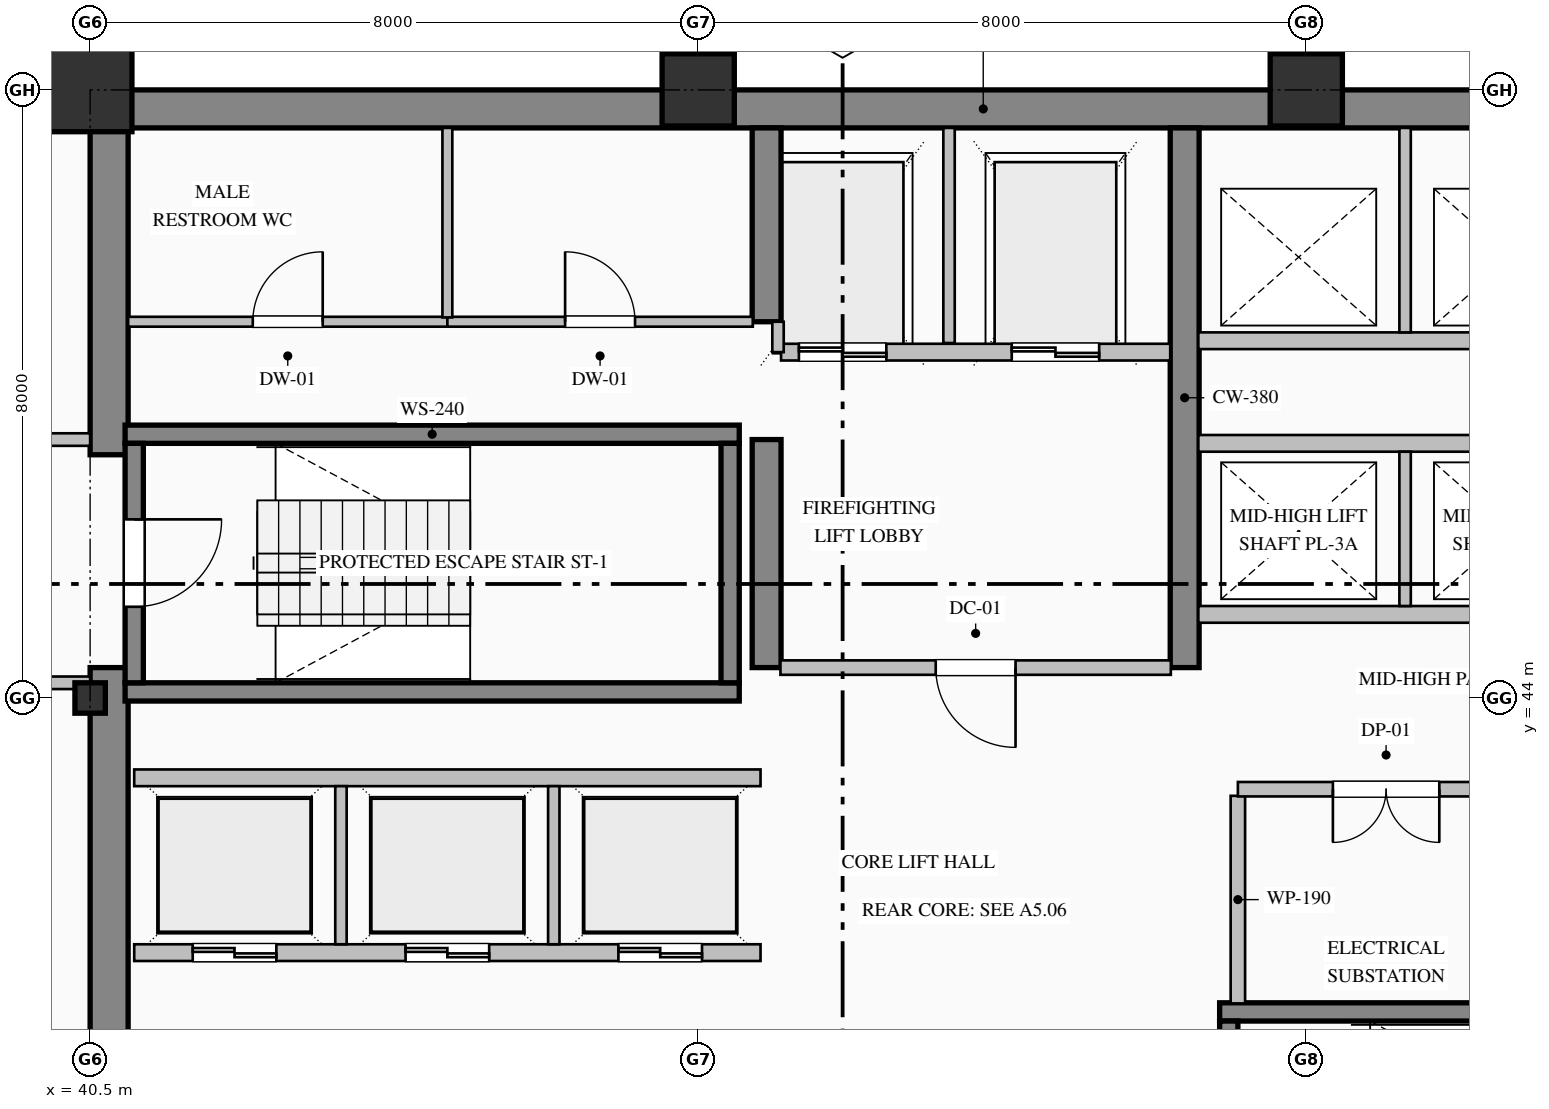
"""IFC4 building model, lengths in metres.
Left out: names, types, materials, properties, quantities, classifications, styles, units other than length and angle.
Written with IfcOpenShell. Run it as: python <this file> out.ifc"""

import sys

from ifc_helpers import new_model, si_unit, direction, frame, frame_2d, origin, origin_2d, place, context, subcontext, project, spatial, rectangle, hollow_rectangle, i_section, extrude, element, fill, save


model = new_model("IFC4")
c1 = context("Model", 3, precision=1e-05, world=origin(), true_north=direction((0.0, 1.0)))
c2 = subcontext(c1, "Body", "Model", "MODEL_VIEW")
j1 = project(units=[si_unit("LENGTHUNIT", "METRE"), si_unit("PLANEANGLEUNIT", "RADIAN")], contexts=[c1])
p1 = place(None, origin())
s1 = spatial("IfcSite", under=j1, at=p1, CompositionType="ELEMENT")
p2 = place(p1, origin())
s2 = spatial("IfcBuilding", under=s1, at=p2, CompositionType="ELEMENT")
p3 = place(p2, frame((0.0, 0.0, 119.0)))
s3 = spatial("IfcBuildingStorey", under=s2, at=p3, CompositionType="ELEMENT", Elevation=119.0)
p4 = place(p3, frame((40.5, 51.75, 0.0), z_axis=(0.0, 0.0, 1.0), x_axis=(1.0, 0.0, 0.0)))
e1 = element("IfcWall", 1, at=p4, inside=s3, PredefinedType="SHEAR", context=c2, shape_type="SweptSolid", body=[
    extrude(rectangle(XDim=23.5, YDim=0.5, at=frame_2d((11.75, 0.0))), origin(), (0.0, 0.0, 1.0), 3.765),
])
p5 = place(p3, frame((40.75, 36.5, 0.0), z_axis=(0.0, 0.0, 1.0), x_axis=(0.0, 1.0, 0.0)))
e2 = element("IfcWall", 2, at=p5, inside=s3, PredefinedType="SHEAR", context=c2, shape_type="SweptSolid", body=[
    extrude(rectangle(XDim=7.9, YDim=0.5, at=frame_2d((3.95, 0.0))), origin(), (0.0, 0.0, 1.0), 3.765),
])
p6 = place(p3, frame((40.75, 47.2, 0.0), z_axis=(0.0, 0.0, 1.0), x_axis=(0.0, 1.0, 0.0)))
e3 = element("IfcWall", 3, at=p6, inside=s3, PredefinedType="SHEAR", context=c2, shape_type="SweptSolid", body=[
    extrude(rectangle(XDim=4.3, YDim=0.5, at=frame_2d((2.15, 0.0))), origin(), (0.0, 0.0, 1.0), 3.765),
])
p7 = place(p3, frame((49.4, 44.4, 0.0), z_axis=(0.0, 0.0, 1.0), x_axis=(0.0, 1.0, 0.0)))
e4 = element("IfcWall", 4, at=p7, inside=s3, PredefinedType="SHEAR", context=c2, shape_type="SweptSolid", body=[
    extrude(rectangle(XDim=3.0, YDim=0.38, at=frame_2d((1.5, 0.0))), origin(), (0.0, 0.0, 1.0), 3.765),
])
p8 = place(p3, frame((49.4, 48.95, 0.0), z_axis=(0.0, 0.0, 1.0), x_axis=(0.0, 1.0, 0.0)))
e5 = element("IfcWall", 5, at=p8, inside=s3, PredefinedType="SHEAR", context=c2, shape_type="SweptSolid", body=[
    extrude(rectangle(XDim=2.55, YDim=0.38, at=frame_2d((1.275, 0.0))), origin(), (0.0, 0.0, 1.0), 3.765),
])
p9 = place(p3, frame((54.9, 44.4, 0.0), z_axis=(0.0, 0.0, 1.0), x_axis=(0.0, 1.0, 0.0)))
e6 = element("IfcWall", 6, at=p9, inside=s3, PredefinedType="SHEAR", context=c2, shape_type="SweptSolid", body=[
    extrude(rectangle(XDim=7.1, YDim=0.38, at=frame_2d((3.55, 0.0))), origin(), (0.0, 0.0, 1.0), 3.765),
])
p10 = place(p3, frame((40.5, 44.0, 0.0), z_axis=(0.0, 0.0, 1.0), x_axis=(1.0, 0.0, 0.0)))
e7 = element("IfcColumn", 7, at=p10, inside=s3, PredefinedType="COLUMN", context=c2, shape_type="SweptSolid", body=[
    extrude(i_section(OverallWidth=0.4, OverallDepth=0.4, WebThickness=0.013, FlangeThickness=0.021, FilletRadius=0.022, at=origin_2d()), origin(), (0.0, 0.0, 1.0), 4.0),
])
p11 = place(p3, frame((40.5, 52.0, 0.0), z_axis=(0.0, 0.0, 1.0), x_axis=(1.0, 0.0, 0.0)))
e8 = element("IfcColumn", 8, at=p11, inside=s3, PredefinedType="COLUMN", context=c2, shape_type="SweptSolid", body=[
    extrude(hollow_rectangle(XDim=1.1, YDim=1.1, WallThickness=0.04, at=origin_2d()), origin(), (0.0, 0.0, 1.0), 4.0),
])
for number, where, z_axis, x_axis in (
    (9, (48.5, 52.0, 0.0), (0.0, 0.0, 1.0), (1.0, 0.0, 0.0)),
    (10, (56.5, 52.0, 0.0), (0.0, 0.0, 1.0), (1.0, 0.0, 0.0)),
):
    element("IfcColumn", number, at=place(p3, frame(where, z_axis=z_axis, x_axis=x_axis)), inside=s3, PredefinedType="COLUMN", context=c2, shape_type="SweptSolid", body=[
        extrude(hollow_rectangle(XDim=0.95, YDim=0.95, WallThickness=0.036, at=origin_2d()), origin(), (0.0, 0.0, 1.0), 4.0),
    ])
p12 = place(p3, frame((13.0, 51.83, 0.0), z_axis=(0.0, 0.0, 1.0), x_axis=(1.0, 0.0, 0.0)))
e11 = element("IfcWall", 11, at=p12, inside=s3, PredefinedType="SOLIDWALL", context=c2, shape_type="SweptSolid", body=[
    extrude(rectangle(XDim=27.52, YDim=0.34, at=frame_2d((13.76, 0.0))), origin(), (0.0, 0.0, 1.0), 3.265),
])
for number, where, z_axis, x_axis in (
    (12, (40.96, 47.47, 0.0), (0.0, 0.0, 1.0), (1.0, 0.0, 0.0)),
    (13, (49.04, 44.08, 0.0), (0.0, 0.0, 1.0), (-1.0, 0.0, 0.0)),
):
    element("IfcWall", number, at=place(p3, frame(where, z_axis=z_axis, x_axis=x_axis)), inside=s3, PredefinedType="SOLIDWALL", context=c2, shape_type="SweptSolid", body=[
        extrude(rectangle(XDim=8.08, YDim=0.24, at=frame_2d((4.04, 0.0))), origin(), (0.0, 0.0, 1.0), 4.0),
    ])
p13 = place(p3, frame((41.08, 47.35, 0.0), z_axis=(0.0, 0.0, 1.0), x_axis=(0.0, -1.0, 0.0)))
e14 = element("IfcWall", 14, at=p13, inside=s3, PredefinedType="SOLIDWALL", context=c2, shape_type="SweptSolid", body=[
    extrude(rectangle(XDim=3.15, YDim=0.24, at=frame_2d((1.575, 0.0))), origin(), (0.0, 0.0, 1.0), 4.0),
])
p14 = place(p13, frame((1.0, 0.0, 0.0)))
e15 = element("IfcOpeningElement", 15, at=p14, cuts=e14, PredefinedType="OPENING", context=c2, shape_type="SweptSolid", body=[
    extrude(rectangle(XDim=1.15, YDim=2.2, at=frame_2d((0.575, 1.1))), frame((0.0, 0.13, 0.0), z_axis=(0.0, -1.0, 0.0), x_axis=(1.0, 0.0, 0.0)), (0.0, 0.0, 1.0), 0.26),
])
p15 = place(p3, frame((48.92, 44.2, 0.0), z_axis=(0.0, 0.0, 1.0), x_axis=(0.0, 1.0, 0.0)))
e16 = element("IfcWall", 16, at=p15, inside=s3, PredefinedType="SOLIDWALL", context=c2, shape_type="SweptSolid", body=[
    extrude(rectangle(XDim=3.15, YDim=0.24, at=frame_2d((1.575, 0.0))), origin(), (0.0, 0.0, 1.0), 4.0),
])
p16 = place(p3, frame((55.36, 39.87, 0.0), z_axis=(0.0, 0.0, 1.0), x_axis=(1.0, 0.0, 0.0)))
e17 = element("IfcWall", 17, at=p16, inside=s3, PredefinedType="SOLIDWALL", context=c2, shape_type="SweptSolid", body=[
    extrude(rectangle(XDim=8.08, YDim=0.24, at=frame_2d((4.04, 0.0))), origin(), (0.0, 0.0, 1.0), 4.0),
])
p17 = place(p3, frame((55.48, 39.75, 0.0), z_axis=(0.0, 0.0, 1.0), x_axis=(0.0, -1.0, 0.0)))
e18 = element("IfcWall", 18, at=p17, inside=s3, PredefinedType="SOLIDWALL", context=c2, shape_type="SweptSolid", body=[
    extrude(rectangle(XDim=3.15, YDim=0.24, at=frame_2d((1.575, 0.0))), origin(), (0.0, 0.0, 1.0), 4.0),
])
p18 = place(p17, frame((1.0, 0.0, 0.0)))
e19 = element("IfcOpeningElement", 19, at=p18, cuts=e18, PredefinedType="OPENING", context=c2, shape_type="SweptSolid", body=[
    extrude(rectangle(XDim=1.15, YDim=2.2, at=frame_2d((0.575, 1.1))), frame((0.0, 0.13, 0.0), z_axis=(0.0, -1.0, 0.0), x_axis=(1.0, 0.0, 0.0)), (0.0, 0.0, 1.0), 0.26),
])
p19 = place(p3, frame((54.71, 48.55, 0.0), z_axis=(0.0, 0.0, 1.0), x_axis=(-1.0, 0.0, 0.0)))
e20 = element("IfcWall", 20, at=p19, inside=s3, PredefinedType="PARTITIONING", context=c2, shape_type="SweptSolid", body=[
    extrude(rectangle(XDim=5.12, YDim=0.22, at=frame_2d((2.56, 0.0))), origin(), (0.0, 0.0, 1.0), 3.765),
])
p20 = place(p19, frame((3.735, 0.0, 0.0)))
e21 = element("IfcOpeningElement", 21, at=p20, cuts=e20, PredefinedType="OPENING", context=c2, shape_type="SweptSolid", body=[
    extrude(rectangle(XDim=1.15, YDim=2.2, at=frame_2d((0.575, 1.1))), frame((0.0, 0.12, 0.0), z_axis=(0.0, -1.0, 0.0), x_axis=(1.0, 0.0, 0.0)), (0.0, 0.0, 1.0), 0.24),
])
p21 = place(p19, frame((0.935, 0.0, 0.0)))
e22 = element("IfcOpeningElement", 22, at=p21, cuts=e20, PredefinedType="OPENING", context=c2, shape_type="SweptSolid", body=[
    extrude(rectangle(XDim=1.15, YDim=2.2, at=frame_2d((0.575, 1.1))), frame((0.0, 0.12, 0.0), z_axis=(0.0, -1.0, 0.0), x_axis=(1.0, 0.0, 0.0)), (0.0, 0.0, 1.0), 0.24),
])
p22 = place(p3, frame((51.8, 48.67, 0.0), z_axis=(0.0, 0.0, 1.0), x_axis=(0.0, 1.0, 0.0)))
e23 = element("IfcWall", 23, at=p22, inside=s3, PredefinedType="PARTITIONING", context=c2, shape_type="SweptSolid", body=[
    extrude(rectangle(XDim=2.83, YDim=0.15, at=frame_2d((1.415, 0.0))), origin(), (0.0, 0.0, 1.0), 3.765),
])
p23 = place(p3, frame((49.55, 48.55, 0.0), z_axis=(0.0, 0.0, 1.0), x_axis=(0.0, 1.0, 0.0)))
e24 = element("IfcWall", 24, at=p23, inside=s3, PredefinedType="PARTITIONING", context=c2, shape_type="SweptSolid", body=[
    extrude(rectangle(XDim=0.4, YDim=0.15, at=frame_2d((0.2, 0.0))), origin(), (0.0, 0.0, 1.0), 3.765),
])
p24 = place(p3, frame((49.32, 40.65, 0.0), z_axis=(0.0, 0.0, 1.0), x_axis=(-1.0, 0.0, 0.0)))
e25 = element("IfcWall", 25, at=p24, inside=s3, PredefinedType="PARTITIONING", context=c2, shape_type="SweptSolid", body=[
    extrude(rectangle(XDim=8.24, YDim=0.22, at=frame_2d((4.12, 0.0))), origin(), (0.0, 0.0, 1.0), 3.765),
])
p25 = place(p24, frame((6.37, 0.0, 0.0)))
e26 = element("IfcOpeningElement", 26, at=p25, cuts=e25, PredefinedType="OPENING", context=c2, shape_type="SweptSolid", body=[
    extrude(rectangle(XDim=1.1, YDim=2.2, at=frame_2d((0.55, 1.1))), frame((0.0, 0.12, 0.0), z_axis=(0.0, -1.0, 0.0), x_axis=(1.0, 0.0, 0.0)), (0.0, 0.0, 1.0), 0.24),
])
p26 = place(p24, frame((3.57, 0.0, 0.0)))
e27 = element("IfcOpeningElement", 27, at=p26, cuts=e25, PredefinedType="OPENING", context=c2, shape_type="SweptSolid", body=[
    extrude(rectangle(XDim=1.1, YDim=2.2, at=frame_2d((0.55, 1.1))), frame((0.0, 0.12, 0.0), z_axis=(0.0, -1.0, 0.0), x_axis=(1.0, 0.0, 0.0)), (0.0, 0.0, 1.0), 0.24),
])
p27 = place(p24, frame((0.77, 0.0, 0.0)))
e28 = element("IfcOpeningElement", 28, at=p27, cuts=e25, PredefinedType="OPENING", context=c2, shape_type="SweptSolid", body=[
    extrude(rectangle(XDim=1.1, YDim=2.2, at=frame_2d((0.55, 1.1))), frame((0.0, 0.12, 0.0), z_axis=(0.0, -1.0, 0.0), x_axis=(1.0, 0.0, 0.0)), (0.0, 0.0, 1.0), 0.24),
])
p28 = place(p3, frame((41.08, 42.95, 0.0), z_axis=(0.0, 0.0, 1.0), x_axis=(1.0, 0.0, 0.0)))
e29 = element("IfcWall", 29, at=p28, inside=s3, PredefinedType="PARTITIONING", context=c2, shape_type="SweptSolid", body=[
    extrude(rectangle(XDim=8.24, YDim=0.22, at=frame_2d((4.12, 0.0))), origin(), (0.0, 0.0, 1.0), 3.765),
])
for number, where, z_axis, x_axis in (
    (30, (43.8, 40.76, 0.0), (0.0, 0.0, 1.0), (0.0, 1.0, 0.0)),
    (31, (46.6, 40.76, 0.0), (0.0, 0.0, 1.0), (0.0, 1.0, 0.0)),
):
    element("IfcWall", number, at=place(p3, frame(where, z_axis=z_axis, x_axis=x_axis)), inside=s3, PredefinedType="PARTITIONING", context=c2, shape_type="SweptSolid", body=[
        extrude(rectangle(XDim=2.08, YDim=0.15, at=frame_2d((1.04, 0.0))), origin(), (0.0, 0.0, 1.0), 3.765),
    ])
for number, where, z_axis, x_axis in (
    (32, (63.32, 45.1, 0.0), (0.0, 0.0, 1.0), (-1.0, 0.0, 0.0)),
    (33, (55.08, 47.35, 0.0), (0.0, 0.0, 1.0), (1.0, 0.0, 0.0)),
):
    element("IfcWall", number, at=place(p3, frame(where, z_axis=z_axis, x_axis=x_axis)), inside=s3, PredefinedType="PARTITIONING", context=c2, shape_type="SweptSolid", body=[
        extrude(rectangle(XDim=8.24, YDim=0.22, at=frame_2d((4.12, 0.0))), origin(), (0.0, 0.0, 1.0), 3.765),
    ])
p29 = place(p3, frame((57.8, 45.21, 0.0), z_axis=(0.0, 0.0, 1.0), x_axis=(0.0, 1.0, 0.0)))
e34 = element("IfcWall", 34, at=p29, inside=s3, PredefinedType="PARTITIONING", context=c2, shape_type="SweptSolid", body=[
    extrude(rectangle(XDim=2.03, YDim=0.15, at=frame_2d((1.015, 0.0))), origin(), (0.0, 0.0, 1.0), 3.765),
])
p30 = place(p3, frame((63.32, 48.7, 0.0), z_axis=(0.0, 0.0, 1.0), x_axis=(-1.0, 0.0, 0.0)))
e35 = element("IfcWall", 35, at=p30, inside=s3, PredefinedType="PARTITIONING", context=c2, shape_type="SweptSolid", body=[
    extrude(rectangle(XDim=8.24, YDim=0.22, at=frame_2d((4.12, 0.0))), origin(), (0.0, 0.0, 1.0), 3.765),
])
p31 = place(p3, frame((57.8, 48.81, 0.0), z_axis=(0.0, 0.0, 1.0), x_axis=(0.0, 1.0, 0.0)))
e36 = element("IfcWall", 36, at=p31, inside=s3, PredefinedType="PARTITIONING", context=c2, shape_type="SweptSolid", body=[
    extrude(rectangle(XDim=2.69, YDim=0.15, at=frame_2d((1.345, 0.0))), origin(), (0.0, 0.0, 1.0), 3.765),
])
p32 = place(p3, frame((37.8, 47.4, 0.0), z_axis=(0.0, 0.0, 1.0), x_axis=(1.0, 0.0, 0.0)))
e37 = element("IfcWall", 37, at=p32, inside=s3, PredefinedType="PARTITIONING", context=c2, shape_type="SweptSolid", body=[
    extrude(rectangle(XDim=2.7, YDim=0.165, at=frame_2d((1.35, 0.0))), origin(), (0.0, 0.0, 1.0), 3.765),
])
p33 = place(p32, frame((0.825, 0.0, 0.0)))
e38 = element("IfcOpeningElement", 38, at=p33, cuts=e37, PredefinedType="OPENING", context=c2, shape_type="SweptSolid", body=[
    extrude(rectangle(XDim=1.05, YDim=2.15, at=frame_2d((0.525, 1.075))), frame((0.0, 0.093, 0.0), z_axis=(0.0, -1.0, 0.0), x_axis=(1.0, 0.0, 0.0)), (0.0, 0.0, 1.0), 0.185),
])
p34 = place(p3, frame((40.5, 44.2, 0.0), z_axis=(0.0, 0.0, 1.0), x_axis=(-1.0, 0.0, 0.0)))
e39 = element("IfcWall", 39, at=p34, inside=s3, PredefinedType="PARTITIONING", context=c2, shape_type="SweptSolid", body=[
    extrude(rectangle(XDim=2.7, YDim=0.165, at=frame_2d((1.35, 0.0))), origin(), (0.0, 0.0, 1.0), 3.765),
])
p35 = place(p34, frame((0.825, 0.0, 0.0)))
e40 = element("IfcOpeningElement", 40, at=p35, cuts=e39, PredefinedType="OPENING", context=c2, shape_type="SweptSolid", body=[
    extrude(rectangle(XDim=1.05, YDim=2.15, at=frame_2d((0.525, 1.075))), frame((0.0, 0.093, 0.0), z_axis=(0.0, -1.0, 0.0), x_axis=(1.0, 0.0, 0.0)), (0.0, 0.0, 1.0), 0.185),
])
p36 = place(p3, frame((41.0, 48.95, 0.0), z_axis=(0.0, 0.0, 1.0), x_axis=(1.0, 0.0, 0.0)))
e41 = element("IfcWall", 41, at=p36, inside=s3, PredefinedType="PARTITIONING", context=c2, shape_type="SweptSolid", body=[
    extrude(rectangle(XDim=4.2, YDim=0.13, at=frame_2d((2.1, 0.0))), origin(), (0.0, 0.0, 1.0), 3.765),
])
p37 = place(p36, frame((1.64, 0.0, 0.0)))
e42 = element("IfcOpeningElement", 42, at=p37, cuts=e41, PredefinedType="OPENING", context=c2, shape_type="SweptSolid", body=[
    extrude(rectangle(XDim=0.92, YDim=2.15, at=frame_2d((0.46, 1.075))), frame((0.0, 0.075, 0.0), z_axis=(0.0, -1.0, 0.0), x_axis=(1.0, 0.0, 0.0)), (0.0, 0.0, 1.0), 0.15),
])
p38 = place(p3, frame((45.2, 48.95, 0.0), z_axis=(0.0, 0.0, 1.0), x_axis=(1.0, 0.0, 0.0)))
e43 = element("IfcWall", 43, at=p38, inside=s3, PredefinedType="PARTITIONING", context=c2, shape_type="SweptSolid", body=[
    extrude(rectangle(XDim=4.018, YDim=0.13, at=frame_2d((2.009, 0.0))), origin(), (0.0, 0.0, 1.0), 3.765),
])
p39 = place(p38, frame((1.549, 0.0, 0.0)))
e44 = element("IfcOpeningElement", 44, at=p39, cuts=e43, PredefinedType="OPENING", context=c2, shape_type="SweptSolid", body=[
    extrude(rectangle(XDim=0.92, YDim=2.15, at=frame_2d((0.46, 1.075))), frame((0.0, 0.075, 0.0), z_axis=(0.0, -1.0, 0.0), x_axis=(1.0, 0.0, 0.0)), (0.0, 0.0, 1.0), 0.15),
])
p40 = place(p3, frame((54.718, 44.4, 0.0), z_axis=(0.0, 0.0, 1.0), x_axis=(-1.0, 0.0, 0.0)))
e45 = element("IfcWall", 45, at=p40, inside=s3, PredefinedType="PARTITIONING", context=c2, shape_type="SweptSolid", body=[
    extrude(rectangle(XDim=5.136, YDim=0.19, at=frame_2d((2.568, 0.0))), origin(), (0.0, 0.0, 1.0), 3.765),
])
p41 = place(p40, frame((2.043, 0.0, 0.0)))
e46 = element("IfcOpeningElement", 46, at=p41, cuts=e45, PredefinedType="OPENING", context=c2, shape_type="SweptSolid", body=[
    extrude(rectangle(XDim=1.05, YDim=2.15, at=frame_2d((0.525, 1.075))), frame((0.0, 0.105, 0.0), z_axis=(0.0, -1.0, 0.0), x_axis=(1.0, 0.0, 0.0)), (0.0, 0.0, 1.0), 0.21),
])
p42 = place(p3, frame((55.6, 42.713, 0.0), z_axis=(0.0, 0.0, 1.0), x_axis=(0.0, -1.0, 0.0)))
e47 = element("IfcWall", 47, at=p42, inside=s3, PredefinedType="PARTITIONING", context=c2, shape_type="SweptSolid", body=[
    extrude(rectangle(XDim=2.731, YDim=0.19, at=frame_2d((1.365, 0.0))), origin(), (0.0, 0.0, 1.0), 3.765),
])
p43 = place(p3, frame((59.5, 42.8, 0.0), z_axis=(0.0, 0.0, 1.0), x_axis=(-1.0, 0.0, 0.0)))
e48 = element("IfcWall", 48, at=p43, inside=s3, PredefinedType="PARTITIONING", context=c2, shape_type="SweptSolid", body=[
    extrude(rectangle(XDim=3.9, YDim=0.19, at=frame_2d((1.95, 0.0))), origin(), (0.0, 0.0, 1.0), 3.765),
])
p44 = place(p43, frame((1.25, 0.0, 0.0)))
e49 = element("IfcOpeningElement", 49, at=p44, cuts=e48, PredefinedType="OPENING", context=c2, shape_type="SweptSolid", body=[
    extrude(rectangle(XDim=1.4, YDim=2.25, at=frame_2d((0.7, 1.125))), frame((0.0, 0.105, 0.0), z_axis=(0.0, -1.0, 0.0), x_axis=(1.0, 0.0, 0.0)), (0.0, 0.0, 1.0), 0.21),
])
p45 = place(p3, frame((45.2, 51.5, 0.0), z_axis=(0.0, 0.0, 1.0), x_axis=(0.0, -1.0, 0.0)))
e50 = element("IfcWall", 50, at=p45, inside=s3, PredefinedType="PARTITIONING", context=c2, shape_type="SweptSolid", body=[
    extrude(rectangle(XDim=2.493, YDim=0.13, at=frame_2d((1.247, 0.0))), origin(), (0.0, 0.0, 1.0), 3.765),
])
p46 = place(p14, origin())
e51 = element("IfcDoor", 51, at=p46, inside=s3, OperationType="SINGLE_SWING_LEFT", PredefinedType="DOOR", context=c2, shape_type="SweptSolid", body=[
    extrude(rectangle(XDim=1.15, YDim=2.2, at=frame_2d((0.575, 1.1))), frame((0.0, 0.025, 0.0), z_axis=(0.0, -1.0, 0.0), x_axis=(1.0, 0.0, 0.0)), (0.0, 0.0, 1.0), 0.05),
])
fill(e15, e51)
p47 = place(p20, origin())
e52 = element("IfcDoor", 52, at=p47, inside=s3, OperationType="DOUBLE_DOOR_SLIDING", PredefinedType="DOOR", context=c2, shape_type="SweptSolid", body=[
    extrude(rectangle(XDim=1.15, YDim=2.2, at=frame_2d((0.575, 1.1))), frame((0.0, 0.025, 0.0), z_axis=(0.0, -1.0, 0.0), x_axis=(1.0, 0.0, 0.0)), (0.0, 0.0, 1.0), 0.05),
])
fill(e21, e52)
p48 = place(p21, origin())
e53 = element("IfcDoor", 53, at=p48, inside=s3, OperationType="DOUBLE_DOOR_SLIDING", PredefinedType="DOOR", context=c2, shape_type="SweptSolid", body=[
    extrude(rectangle(XDim=1.15, YDim=2.2, at=frame_2d((0.575, 1.1))), frame((0.0, 0.025, 0.0), z_axis=(0.0, -1.0, 0.0), x_axis=(1.0, 0.0, 0.0)), (0.0, 0.0, 1.0), 0.05),
])
fill(e22, e53)
p49 = place(p25, origin())
e54 = element("IfcDoor", 54, at=p49, inside=s3, OperationType="DOUBLE_DOOR_SLIDING", PredefinedType="DOOR", context=c2, shape_type="SweptSolid", body=[
    extrude(rectangle(XDim=1.1, YDim=2.2, at=frame_2d((0.55, 1.1))), frame((0.0, 0.025, 0.0), z_axis=(0.0, -1.0, 0.0), x_axis=(1.0, 0.0, 0.0)), (0.0, 0.0, 1.0), 0.05),
])
fill(e26, e54)
p50 = place(p26, origin())
e55 = element("IfcDoor", 55, at=p50, inside=s3, OperationType="DOUBLE_DOOR_SLIDING", PredefinedType="DOOR", context=c2, shape_type="SweptSolid", body=[
    extrude(rectangle(XDim=1.1, YDim=2.2, at=frame_2d((0.55, 1.1))), frame((0.0, 0.025, 0.0), z_axis=(0.0, -1.0, 0.0), x_axis=(1.0, 0.0, 0.0)), (0.0, 0.0, 1.0), 0.05),
])
fill(e27, e55)
p51 = place(p27, origin())
e56 = element("IfcDoor", 56, at=p51, inside=s3, OperationType="DOUBLE_DOOR_SLIDING", PredefinedType="DOOR", context=c2, shape_type="SweptSolid", body=[
    extrude(rectangle(XDim=1.1, YDim=2.2, at=frame_2d((0.55, 1.1))), frame((0.0, 0.025, 0.0), z_axis=(0.0, -1.0, 0.0), x_axis=(1.0, 0.0, 0.0)), (0.0, 0.0, 1.0), 0.05),
])
fill(e28, e56)
p52 = place(p41, origin())
e57 = element("IfcDoor", 57, at=p52, inside=s3, OperationType="SINGLE_SWING_LEFT", PredefinedType="DOOR", context=c2, shape_type="SweptSolid", body=[
    extrude(rectangle(XDim=1.05, YDim=2.15, at=frame_2d((0.525, 1.075))), frame((0.0, 0.025, 0.0), z_axis=(0.0, -1.0, 0.0), x_axis=(1.0, 0.0, 0.0)), (0.0, 0.0, 1.0), 0.05),
])
fill(e46, e57)
p53 = place(p37, origin())
e58 = element("IfcDoor", 58, at=p53, inside=s3, OperationType="SINGLE_SWING_RIGHT", PredefinedType="DOOR", context=c2, shape_type="SweptSolid", body=[
    extrude(rectangle(XDim=0.92, YDim=2.15, at=frame_2d((0.46, 1.075))), frame((0.0, 0.025, 0.0), z_axis=(0.0, -1.0, 0.0), x_axis=(1.0, 0.0, 0.0)), (0.0, 0.0, 1.0), 0.05),
])
fill(e42, e58)
p54 = place(p39, origin())
e59 = element("IfcDoor", 59, at=p54, inside=s3, OperationType="SINGLE_SWING_LEFT", PredefinedType="DOOR", context=c2, shape_type="SweptSolid", body=[
    extrude(rectangle(XDim=0.92, YDim=2.15, at=frame_2d((0.46, 1.075))), frame((0.0, 0.025, 0.0), z_axis=(0.0, -1.0, 0.0), x_axis=(1.0, 0.0, 0.0)), (0.0, 0.0, 1.0), 0.05),
])
fill(e44, e59)
p55 = place(p44, origin())
e60 = element("IfcDoor", 60, at=p55, inside=s3, OperationType="DOUBLE_DOOR_SINGLE_SWING", PredefinedType="DOOR", context=c2, shape_type="SweptSolid", body=[
    extrude(rectangle(XDim=1.4, YDim=2.25, at=frame_2d((0.7, 1.125))), frame((0.0, 0.025, 0.0), z_axis=(0.0, -1.0, 0.0), x_axis=(1.0, 0.0, 0.0)), (0.0, 0.0, 1.0), 0.05),
])
fill(e49, e60)
save(model, sys.argv[1])
